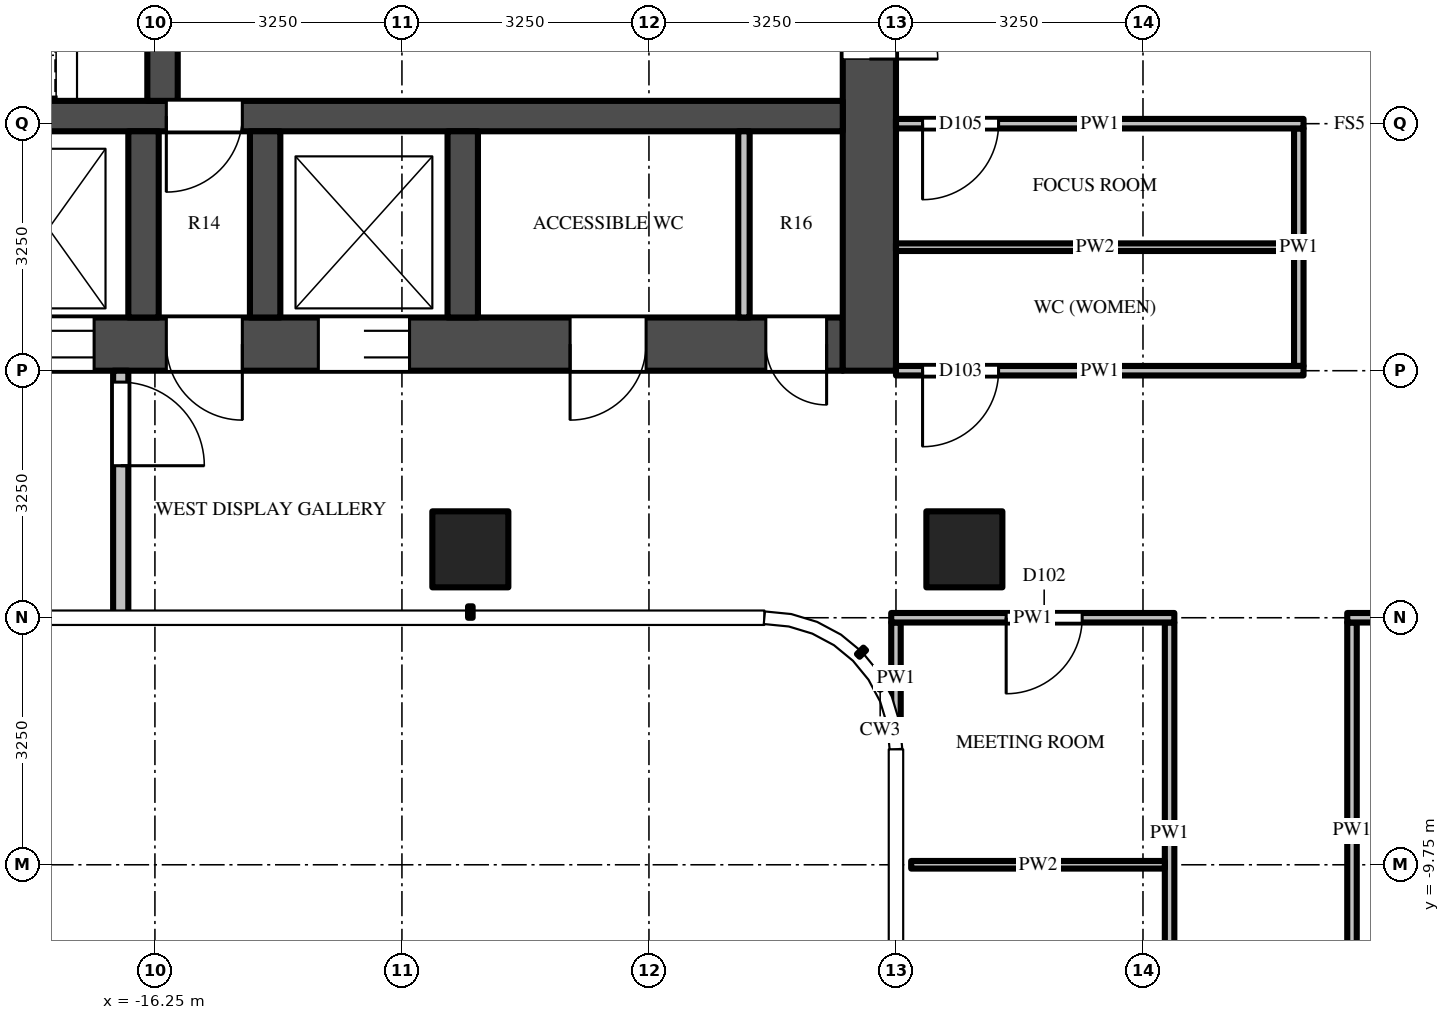
"""IFC4 building model, lengths in metres.
Left out: names, types, materials, properties, quantities, classifications, styles, units other than length and angle.
Written with IfcOpenShell. Run it as: python <this file> out.ifc"""

import sys

from ifc_helpers import new_model, si_unit, direction, frame, frame_2d, origin, origin_2d, place, context, subcontext, project, spatial, rectangle, extrude, source, transform, mapped, element, fill, save


model = new_model("IFC4")
c1 = context("Model", 3, precision=1e-05, world=origin(), true_north=direction((0.0, 1.0)))
c2 = subcontext(c1, "Body", "Model", "MODEL_VIEW")
j1 = project(units=[si_unit("LENGTHUNIT", "METRE"), si_unit("PLANEANGLEUNIT", "RADIAN")], contexts=[c1])
p1 = place(None, origin())
s1 = spatial("IfcSite", under=j1, at=p1, CompositionType="ELEMENT")
p2 = place(p1, origin())
s2 = spatial("IfcBuilding", under=s1, at=p2, CompositionType="ELEMENT")
p3 = place(p2, frame((0.0, 0.0, 283.3)))
s3 = spatial("IfcBuildingStorey", under=s2, at=p3, CompositionType="ELEMENT", Elevation=283.3)
m1 = source(origin(), c2, "Body", "SweptSolid", [
    extrude(rectangle(XDim=1.0, YDim=1.0, at=origin_2d()), origin(), (0.0, 0.0, 1.0), 3.9),
])
for number, where, z_axis, x_axis in (
    (1, (-5.6, -5.6, 0.0), (0.0, 0.0, 1.0), (1.0, 0.0, 0.0)),
    (2, (-12.1, -5.6, 0.0), (0.0, 0.0, 1.0), (1.0, 0.0, 0.0)),
):
    element("IfcColumn", number, at=place(p3, frame(where, z_axis=z_axis, x_axis=x_axis)), inside=s3, PredefinedType="COLUMN", context=c2, shape_type="MappedRepresentation", body=[
        mapped(m1, transform((0.0, 0.0, 0.0))),
    ])
m2 = source(origin(), c2, "Body", "SweptSolid", [
    extrude(rectangle(XDim=14.85, YDim=0.7, at=frame_2d((7.425, 0.0))), origin(), (0.0, 0.0, 1.0), 3.7),
])
p4 = place(p3, frame((-7.2, -2.9, 0.0), z_axis=(0.0, 0.0, 1.0), x_axis=(-1.0, 0.0, 0.0)))
e3 = element("IfcWall", 3, at=p4, inside=s3, PredefinedType="SHEAR", context=c2, shape_type="MappedRepresentation", body=[
    mapped(m2, transform((0.0, 0.0, 0.0))),
])
m3 = source(origin(), c2, "Body", "SweptSolid", [
    extrude(rectangle(XDim=1.2, YDim=2.1, at=frame_2d((0.6, 1.05))), frame((0.0, 0.36, 0.0), z_axis=(0.0, -1.0, 0.0), x_axis=(1.0, 0.0, 0.0)), (0.0, 0.0, 1.0), 0.72),
])
p5 = place(p4, frame((5.7, 0.0, 0.0)))
e4 = element("IfcOpeningElement", 4, at=p5, cuts=e3, PredefinedType="OPENING", context=c2, shape_type="MappedRepresentation", body=[
    mapped(m3, transform((0.0, 0.0, 0.0))),
])
m4 = source(origin(), c2, "Body", "SweptSolid", [
    extrude(rectangle(XDim=1.3, YDim=2.1, at=frame_2d((0.65, 1.05))), frame((0.0, 0.36, 0.0), z_axis=(0.0, -1.0, 0.0), x_axis=(1.0, 0.0, 0.0)), (0.0, 0.0, 1.0), 0.72),
])
p6 = place(p4, frame((12.2, 0.0, 0.0)))
e5 = element("IfcOpeningElement", 5, at=p6, cuts=e3, PredefinedType="OPENING", context=c2, shape_type="MappedRepresentation", body=[
    mapped(m4, transform((0.0, 0.0, 0.0))),
])
p7 = place(p4, frame((9.85, 0.0, 0.0)))
e6 = element("IfcOpeningElement", 6, at=p7, cuts=e3, PredefinedType="OPENING", context=c2, shape_type="MappedRepresentation", body=[
    mapped(m3, transform((0.0, 0.0, 0.0))),
])
m5 = source(origin(), c2, "Body", "SweptSolid", [
    extrude(rectangle(XDim=1.0, YDim=2.1, at=frame_2d((0.5, 1.05))), frame((0.0, 0.36, 0.0), z_axis=(0.0, -1.0, 0.0), x_axis=(1.0, 0.0, 0.0)), (0.0, 0.0, 1.0), 0.72),
])
p8 = place(p4, frame((7.9, 0.0, 0.0)))
e7 = element("IfcOpeningElement", 7, at=p8, cuts=e3, PredefinedType="OPENING", context=c2, shape_type="MappedRepresentation", body=[
    mapped(m5, transform((0.0, 0.0, 0.0))),
])
m6 = source(origin(), c2, "Body", "SweptSolid", [
    extrude(rectangle(XDim=0.8, YDim=2.1, at=frame_2d((0.4, 1.05))), frame((0.0, 0.36, 0.0), z_axis=(0.0, -1.0, 0.0), x_axis=(1.0, 0.0, 0.0)), (0.0, 0.0, 1.0), 0.72),
])
p9 = place(p4, frame((0.212, 0.0, 0.0)))
e8 = element("IfcOpeningElement", 8, at=p9, cuts=e3, PredefinedType="OPENING", context=c2, shape_type="MappedRepresentation", body=[
    mapped(m6, transform((0.0, 0.0, 0.0))),
])
p10 = place(p4, frame((2.587, 0.0, 0.0)))
e9 = element("IfcOpeningElement", 9, at=p10, cuts=e3, PredefinedType="OPENING", context=c2, shape_type="MappedRepresentation", body=[
    mapped(m5, transform((0.0, 0.0, 0.0))),
])
m7 = source(origin(), c2, "Body", "SweptSolid", [
    extrude(rectangle(XDim=9.05, YDim=0.7, at=frame_2d((4.525, 0.0))), origin(), (0.0, 0.0, 1.0), 3.7),
])
p11 = place(p3, frame((-6.85, 5.8, 0.0), z_axis=(0.0, 0.0, 1.0), x_axis=(0.0, -1.0, 0.0)))
e10 = element("IfcWall", 10, at=p11, inside=s3, PredefinedType="SHEAR", context=c2, shape_type="MappedRepresentation", body=[
    mapped(m7, transform((0.0, 0.0, 0.0))),
])
m8 = source(origin(), c2, "Body", "SweptSolid", [
    extrude(rectangle(XDim=1.8, YDim=2.1, at=frame_2d((0.9, 1.05))), frame((0.0, 0.36, 0.0), z_axis=(0.0, -1.0, 0.0), x_axis=(1.0, 0.0, 0.0)), (0.0, 0.0, 1.0), 0.72),
])
p12 = place(p11, frame((3.15, 0.0, 0.0)))
e11 = element("IfcOpeningElement", 11, at=p12, cuts=e10, PredefinedType="OPENING", context=c2, shape_type="MappedRepresentation", body=[
    mapped(m8, transform((0.0, 0.0, 0.0))),
])
m9 = source(origin(), c2, "Body", "SweptSolid", [
    extrude(rectangle(XDim=14.85, YDim=0.4, at=frame_2d((7.425, 0.0))), origin(), (0.0, 0.0, 1.0), 3.7),
])
p13 = place(p3, frame((-7.2, 0.1, 0.0), z_axis=(0.0, 0.0, 1.0), x_axis=(-1.0, 0.0, 0.0)))
e12 = element("IfcWall", 12, at=p13, inside=s3, PredefinedType="SHEAR", context=c2, shape_type="MappedRepresentation", body=[
    mapped(m9, transform((0.0, 0.0, 0.0))),
])
m10 = source(origin(), c2, "Body", "SweptSolid", [
    extrude(rectangle(XDim=1.0, YDim=2.1, at=frame_2d((0.5, 1.05))), frame((0.0, 0.21, 0.0), z_axis=(0.0, -1.0, 0.0), x_axis=(1.0, 0.0, 0.0)), (0.0, 0.0, 1.0), 0.42),
])
p14 = place(p13, frame((7.9, 0.0, 0.0)))
e13 = element("IfcOpeningElement", 13, at=p14, cuts=e12, PredefinedType="OPENING", context=c2, shape_type="MappedRepresentation", body=[
    mapped(m10, transform((0.0, 0.0, 0.0))),
])
m11 = source(origin(), c2, "Body", "SweptSolid", [
    extrude(rectangle(XDim=5.5, YDim=0.4, at=frame_2d((2.75, 0.0))), origin(), (0.0, 0.0, 1.0), 3.7),
])
p15 = place(p3, frame((-16.15, 5.8, 0.0), z_axis=(0.0, 0.0, 1.0), x_axis=(0.0, -1.0, 0.0)))
e14 = element("IfcWall", 14, at=p15, inside=s3, PredefinedType="SHEAR", context=c2, shape_type="MappedRepresentation", body=[
    mapped(m11, transform((0.0, 0.0, 0.0))),
])
m12 = source(origin(), c2, "Body", "SweptSolid", [
    extrude(rectangle(XDim=1.1, YDim=2.1, at=frame_2d((0.55, 1.05))), frame((0.0, 0.21, 0.0), z_axis=(0.0, -1.0, 0.0), x_axis=(1.0, 0.0, 0.0)), (0.0, 0.0, 1.0), 0.42),
])
p16 = place(p15, frame((0.725, 0.0, 0.0)))
e15 = element("IfcOpeningElement", 15, at=p16, cuts=e14, PredefinedType="OPENING", context=c2, shape_type="MappedRepresentation", body=[
    mapped(m12, transform((0.0, 0.0, 0.0))),
])
p17 = place(p15, frame((3.675, 0.0, 0.0)))
e16 = element("IfcOpeningElement", 16, at=p17, cuts=e14, PredefinedType="OPENING", context=c2, shape_type="MappedRepresentation", body=[
    mapped(m12, transform((0.0, 0.0, 0.0))),
])
m13 = source(origin(), c2, "Body", "SweptSolid", [
    extrude(rectangle(XDim=2.45, YDim=0.4, at=frame_2d((1.225, 0.0))), origin(), (0.0, 0.0, 1.0), 3.7),
])
for number, where, z_axis, x_axis in (
    (17, (-12.2, -0.1, 0.0), (0.0, 0.0, 1.0), (0.0, -1.0, 0.0)),
    (18, (-14.8, -0.1, 0.0), (0.0, 0.0, 1.0), (0.0, -1.0, 0.0)),
    (19, (-16.4, -0.1, 0.0), (0.0, 0.0, 1.0), (0.0, -1.0, 0.0)),
):
    element("IfcWall", number, at=place(p3, frame(where, z_axis=z_axis, x_axis=x_axis)), inside=s3, PredefinedType="SHEAR", context=c2, shape_type="MappedRepresentation", body=[
        mapped(m13, transform((0.0, 0.0, 0.0))),
    ])
m14 = source(origin(), c2, "Body", "SweptSolid", [
    extrude(rectangle(XDim=3.25, YDim=0.2, at=frame_2d((1.625, 0.0))), origin(), (0.0, 0.0, 1.0), 3.7),
])
p18 = place(p3, frame((-16.7, -3.25, 0.0), z_axis=(0.0, 0.0, 1.0), x_axis=(0.0, -1.0, 0.0)))
e20 = element("IfcWall", 20, at=p18, inside=s3, PredefinedType="PARTITIONING", context=c2, shape_type="MappedRepresentation", body=[
    mapped(m14, transform((0.0, 0.0, 0.0))),
])
m15 = source(origin(), c2, "Body", "SweptSolid", [
    extrude(rectangle(XDim=1.1, YDim=2.1, at=frame_2d((0.55, 1.05))), frame((0.0, 0.11, 0.0), z_axis=(0.0, -1.0, 0.0), x_axis=(1.0, 0.0, 0.0)), (0.0, 0.0, 1.0), 0.22),
])
p19 = place(p18, frame((0.15, 0.0, 0.0)))
e21 = element("IfcOpeningElement", 21, at=p19, cuts=e20, PredefinedType="OPENING", context=c2, shape_type="MappedRepresentation", body=[
    mapped(m15, transform((0.0, 0.0, 0.0))),
])
m16 = source(origin(), c2, "Body", "SweptSolid", [
    extrude(rectangle(XDim=2.45, YDim=0.15, at=frame_2d((1.225, 0.0))), origin(), (0.0, 0.0, 1.0), 3.7),
])
p20 = place(p3, frame((-8.5, -0.1, 0.0), z_axis=(0.0, 0.0, 1.0), x_axis=(0.0, -1.0, 0.0)))
e22 = element("IfcWall", 22, at=p20, inside=s3, PredefinedType="PARTITIONING", context=c2, shape_type="MappedRepresentation", body=[
    mapped(m16, transform((0.0, 0.0, 0.0))),
])
m17 = source(origin(), c2, "Body", "SweptSolid", [
    extrude(rectangle(XDim=1.469, YDim=0.125, at=frame_2d((0.734, 0.0))), origin(), (0.0, 0.0, 1.0), 3.7),
])
p21 = place(p3, frame((-6.5, -6.562, 0.0), z_axis=(0.0, 0.0, 1.0), x_axis=(0.0, -1.0, 0.0)))
e23 = element("IfcWall", 23, at=p21, inside=s3, PredefinedType="PARTITIONING", context=c2, shape_type="MappedRepresentation", body=[
    mapped(m17, transform((0.0, 0.0, 0.0))),
])
m18 = source(origin(), c2, "Body", "SweptSolid", [
    extrude(rectangle(XDim=5.538, YDim=0.125, at=frame_2d((2.769, 0.0))), origin(), (0.0, 0.0, 1.0), 2.997),
])
p22 = place(p3, frame((-2.9, -12.1, 0.0), z_axis=(0.0, 0.0, 1.0), x_axis=(0.0, 1.0, 0.0)))
e24 = element("IfcWall", 24, at=p22, inside=s3, PredefinedType="PARTITIONING", context=c2, shape_type="MappedRepresentation", body=[
    mapped(m18, transform((0.0, 0.0, 0.0))),
])
m19 = source(origin(), c2, "Body", "SweptSolid", [
    extrude(rectangle(XDim=3.125, YDim=0.125, at=frame_2d((1.562, 0.0))), origin(), (0.0, 0.0, 1.0), 3.068),
])
p23 = place(p3, frame((-1.2, -0.062, 0.0), z_axis=(0.0, 0.0, 1.0), x_axis=(0.0, -1.0, 0.0)))
e25 = element("IfcWall", 25, at=p23, inside=s3, PredefinedType="PARTITIONING", context=c2, shape_type="MappedRepresentation", body=[
    mapped(m19, transform((0.0, 0.0, 0.0))),
])
m20 = source(origin(), c2, "Body", "SweptSolid", [
    extrude(rectangle(XDim=5.475, YDim=0.125, at=frame_2d((2.738, 0.0))), origin(), (0.0, 0.0, 1.0), 2.997),
])
p24 = place(p3, frame((-0.5, -6.562, 0.0), z_axis=(0.0, 0.0, 1.0), x_axis=(0.0, -1.0, 0.0)))
e26 = element("IfcWall", 26, at=p24, inside=s3, PredefinedType="PARTITIONING", context=c2, shape_type="MappedRepresentation", body=[
    mapped(m20, transform((0.0, 0.0, 0.0))),
])
m21 = source(origin(), c2, "Body", "SweptSolid", [
    extrude(rectangle(XDim=3.338, YDim=0.1, at=frame_2d((1.669, 0.0))), origin(), (0.0, 0.0, 1.0), 2.78),
])
p25 = place(p3, frame((-6.3, -9.75, 0.0), z_axis=(0.0, 0.0, 1.0), x_axis=(1.0, 0.0, 0.0)))
e27 = element("IfcWall", 27, at=p25, inside=s3, PredefinedType="PARTITIONING", context=c2, shape_type="MappedRepresentation", body=[
    mapped(m21, transform((0.0, 0.0, 0.0))),
])
m22 = source(origin(), c2, "Body", "SweptSolid", [
    extrude(rectangle(XDim=3.725, YDim=0.125, at=frame_2d((1.863, 0.0))), origin(), (0.0, 0.0, 1.0), 2.78),
])
p26 = place(p3, frame((-2.837, -6.5, 0.0), z_axis=(0.0, 0.0, 1.0), x_axis=(-1.0, 0.0, 0.0)))
e28 = element("IfcWall", 28, at=p26, inside=s3, PredefinedType="PARTITIONING", context=c2, shape_type="MappedRepresentation", body=[
    mapped(m22, transform((0.0, 0.0, 0.0))),
])
m23 = source(origin(), c2, "Body", "SweptSolid", [
    extrude(rectangle(XDim=1.0, YDim=2.1, at=frame_2d((0.5, 1.05))), frame((0.0, 0.073, 0.0), z_axis=(0.0, -1.0, 0.0), x_axis=(1.0, 0.0, 0.0)), (0.0, 0.0, 1.0), 0.145),
])
p27 = place(p26, frame((1.212, 0.0, 0.0)))
e29 = element("IfcOpeningElement", 29, at=p27, cuts=e28, PredefinedType="OPENING", context=c2, shape_type="MappedRepresentation", body=[
    mapped(m23, transform((0.0, 0.0, 0.0))),
])
m24 = source(origin(), c2, "Body", "SweptSolid", [
    extrude(rectangle(XDim=1.825, YDim=0.125, at=frame_2d((0.913, 0.0))), origin(), (0.0, 0.0, 1.0), 3.7),
])
p28 = place(p3, frame((1.262, -6.5, 0.0), z_axis=(0.0, 0.0, 1.0), x_axis=(-1.0, 0.0, 0.0)))
e30 = element("IfcWall", 30, at=p28, inside=s3, PredefinedType="PARTITIONING", context=c2, shape_type="MappedRepresentation", body=[
    mapped(m24, transform((0.0, 0.0, 0.0))),
])
m25 = source(origin(), c2, "Body", "SweptSolid", [
    extrude(rectangle(XDim=5.363, YDim=0.125, at=frame_2d((2.681, 0.0))), origin(), (0.0, 0.0, 1.0), 2.997),
])
p29 = place(p3, frame((-1.137, -3.25, 0.0), z_axis=(0.0, 0.0, 1.0), x_axis=(-1.0, 0.0, 0.0)))
e31 = element("IfcWall", 31, at=p29, inside=s3, PredefinedType="PARTITIONING", context=c2, shape_type="MappedRepresentation", body=[
    mapped(m25, transform((0.0, 0.0, 0.0))),
])
p30 = place(p29, frame((4.012, 0.0, 0.0)))
e32 = element("IfcOpeningElement", 32, at=p30, cuts=e31, PredefinedType="OPENING", context=c2, shape_type="MappedRepresentation", body=[
    mapped(m23, transform((0.0, 0.0, 0.0))),
])
m26 = source(origin(), c2, "Body", "SweptSolid", [
    extrude(rectangle(XDim=5.238, YDim=0.1, at=frame_2d((2.619, 0.0))), origin(), (0.0, 0.0, 1.0), 2.997),
])
p31 = place(p3, frame((-6.5, -1.625, 0.0), z_axis=(0.0, 0.0, 1.0), x_axis=(1.0, 0.0, 0.0)))
e33 = element("IfcWall", 33, at=p31, inside=s3, PredefinedType="PARTITIONING", context=c2, shape_type="MappedRepresentation", body=[
    mapped(m26, transform((0.0, 0.0, 0.0))),
])
p32 = place(p3, frame((-1.137, 0.0, 0.0), z_axis=(0.0, 0.0, 1.0), x_axis=(-1.0, 0.0, 0.0)))
e34 = element("IfcWall", 34, at=p32, inside=s3, PredefinedType="PARTITIONING", context=c2, shape_type="MappedRepresentation", body=[
    mapped(m25, transform((0.0, 0.0, 0.0))),
])
p33 = place(p32, frame((4.012, 0.0, 0.0)))
e35 = element("IfcOpeningElement", 35, at=p33, cuts=e34, PredefinedType="OPENING", context=c2, shape_type="MappedRepresentation", body=[
    mapped(m23, transform((0.0, 0.0, 0.0))),
])
m27 = source(origin(), c2, "Body", "SweptSolid", [
    extrude(rectangle(XDim=1.2, YDim=2.1, at=frame_2d((0.6, 1.05))), frame((0.0, -0.275, 0.0), z_axis=(0.0, -1.0, 0.0), x_axis=(1.0, 0.0, 0.0)), (0.0, 0.0, 1.0), 0.05),
])
p34 = place(p5, origin())
e36 = element("IfcDoor", 36, at=p34, inside=s3, OperationType="DOUBLE_DOOR_SLIDING", PredefinedType="DOOR", context=c2, shape_type="MappedRepresentation", body=[
    mapped(m27, transform((0.0, 0.0, 0.0))),
])
fill(e4, e36)
p35 = place(p7, origin())
e37 = element("IfcDoor", 37, at=p35, inside=s3, OperationType="DOUBLE_DOOR_SLIDING", PredefinedType="DOOR", context=c2, shape_type="MappedRepresentation", body=[
    mapped(m27, transform((0.0, 0.0, 0.0))),
])
fill(e6, e37)
m28 = source(origin(), c2, "Body", "SweptSolid", [
    extrude(rectangle(XDim=1.8, YDim=2.1, at=frame_2d((0.9, 1.05))), frame((0.0, -0.275, 0.0), z_axis=(0.0, -1.0, 0.0), x_axis=(1.0, 0.0, 0.0)), (0.0, 0.0, 1.0), 0.05),
])
p36 = place(p12, origin())
e38 = element("IfcDoor", 38, at=p36, inside=s3, OperationType="DOUBLE_DOOR_SINGLE_SWING", PredefinedType="DOOR", context=c2, shape_type="MappedRepresentation", body=[
    mapped(m28, transform((0.0, 0.0, 0.0))),
])
fill(e11, e38)
m29 = source(origin(), c2, "Body", "SweptSolid", [
    extrude(rectangle(XDim=1.0, YDim=2.1, at=frame_2d((0.5, 1.05))), frame((0.0, 0.025, 0.0), z_axis=(0.0, -1.0, 0.0), x_axis=(1.0, 0.0, 0.0)), (0.0, 0.0, 1.0), 0.05),
])
p37 = place(p14, origin())
e39 = element("IfcDoor", 39, at=p37, inside=s3, OperationType="SINGLE_SWING_RIGHT", PredefinedType="DOOR", context=c2, shape_type="MappedRepresentation", body=[
    mapped(m29, transform((0.0, 0.0, 0.0))),
])
fill(e13, e39)
m30 = source(origin(), c2, "Body", "SweptSolid", [
    extrude(rectangle(XDim=1.0, YDim=2.1, at=frame_2d((0.5, 1.05))), frame((0.0, -0.275, 0.0), z_axis=(0.0, -1.0, 0.0), x_axis=(1.0, 0.0, 0.0)), (0.0, 0.0, 1.0), 0.05),
])
p38 = place(p8, origin())
e40 = element("IfcDoor", 40, at=p38, inside=s3, OperationType="SINGLE_SWING_LEFT", PredefinedType="DOOR", context=c2, shape_type="MappedRepresentation", body=[
    mapped(m30, transform((0.0, 0.0, 0.0))),
])
fill(e7, e40)
m31 = source(origin(), c2, "Body", "SweptSolid", [
    extrude(rectangle(XDim=1.1, YDim=2.1, at=frame_2d((0.55, 1.05))), frame((0.0, 0.025, 0.0), z_axis=(0.0, -1.0, 0.0), x_axis=(1.0, 0.0, 0.0)), (0.0, 0.0, 1.0), 0.05),
])
p39 = place(p19, origin())
e41 = element("IfcDoor", 41, at=p39, inside=s3, OperationType="SINGLE_SWING_RIGHT", PredefinedType="DOOR", context=c2, shape_type="MappedRepresentation", body=[
    mapped(m31, transform((0.0, 0.0, 0.0))),
])
fill(e21, e41)
m32 = source(origin(), c2, "Body", "SweptSolid", [
    extrude(rectangle(XDim=0.8, YDim=2.1, at=frame_2d((0.4, 1.05))), frame((0.0, -0.275, 0.0), z_axis=(0.0, -1.0, 0.0), x_axis=(1.0, 0.0, 0.0)), (0.0, 0.0, 1.0), 0.05),
])
p40 = place(p9, origin())
e42 = element("IfcDoor", 42, at=p40, inside=s3, OperationType="SINGLE_SWING_LEFT", PredefinedType="DOOR", context=c2, shape_type="MappedRepresentation", body=[
    mapped(m32, transform((0.0, 0.0, 0.0))),
])
fill(e8, e42)
p41 = place(p10, origin())
e43 = element("IfcDoor", 43, at=p41, inside=s3, OperationType="SINGLE_SWING_RIGHT", PredefinedType="DOOR", context=c2, shape_type="MappedRepresentation", body=[
    mapped(m30, transform((0.0, 0.0, 0.0))),
])
fill(e9, e43)
p42 = place(p27, origin())
e44 = element("IfcDoor", 44, at=p42, inside=s3, OperationType="SINGLE_SWING_RIGHT", PredefinedType="DOOR", context=c2, shape_type="MappedRepresentation", body=[
    mapped(m29, transform((0.0, 0.0, 0.0))),
])
fill(e29, e44)
p43 = place(p30, origin())
e45 = element("IfcDoor", 45, at=p43, inside=s3, OperationType="SINGLE_SWING_RIGHT", PredefinedType="DOOR", context=c2, shape_type="MappedRepresentation", body=[
    mapped(m29, transform((0.0, 0.0, 0.0))),
])
fill(e32, e45)
p44 = place(p33, origin())
e46 = element("IfcDoor", 46, at=p44, inside=s3, OperationType="SINGLE_SWING_RIGHT", PredefinedType="DOOR", context=c2, shape_type="MappedRepresentation", body=[
    mapped(m29, transform((0.0, 0.0, 0.0))),
])
fill(e35, e46)
save(model, sys.argv[1])
